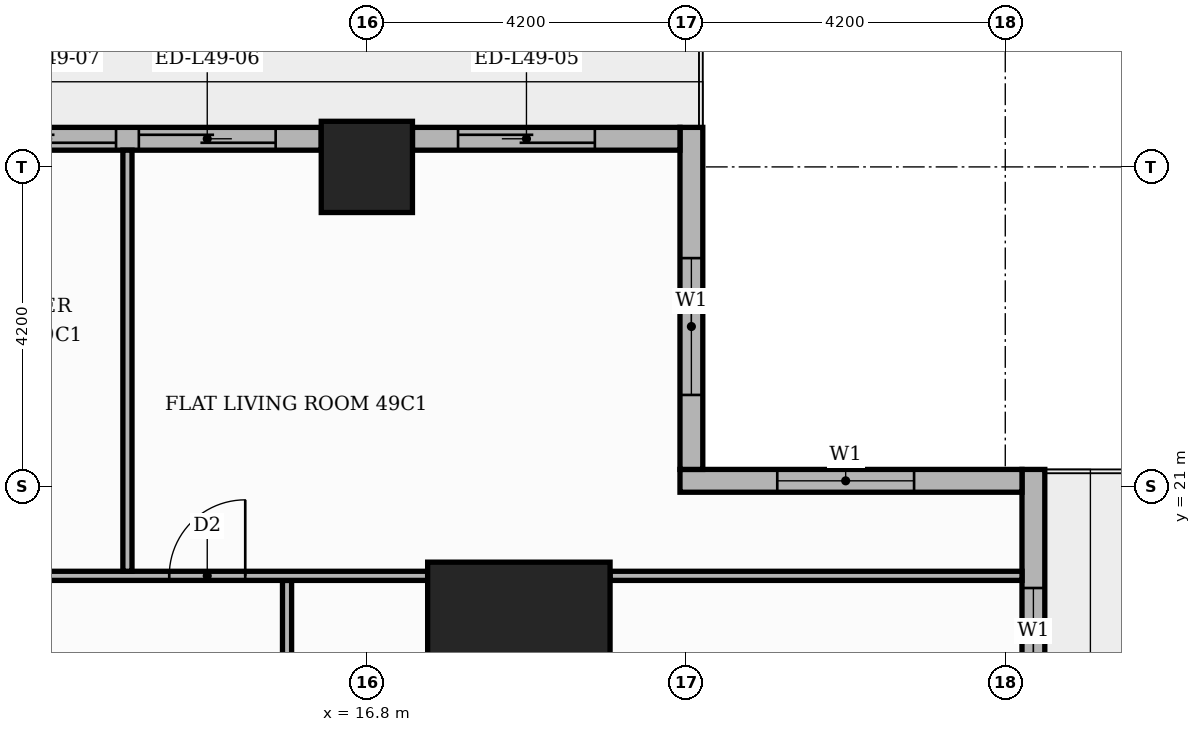
"""IFC4 building model, lengths in metres.
Left out: names, types, materials, properties, quantities, classifications, styles, units other than length and angle.
Written with IfcOpenShell. Run it as: python <this file> out.ifc"""

import sys

from ifc_helpers import new_model, si_unit, direction, frame, frame_2d, origin, origin_2d, place, context, subcontext, project, spatial, rectangle, extrude, element, fill, save


model = new_model("IFC4")
c1 = context("Model", 3, precision=1e-05, world=origin(), true_north=direction((0.0, 1.0)))
c2 = subcontext(c1, "Body", "Model", "MODEL_VIEW")
j1 = project(units=[si_unit("LENGTHUNIT", "METRE"), si_unit("PLANEANGLEUNIT", "RADIAN")], contexts=[c1])
p1 = place(None, origin())
s1 = spatial("IfcSite", under=j1, at=p1, CompositionType="ELEMENT")
p2 = place(p1, origin())
s2 = spatial("IfcBuilding", under=s1, at=p2, CompositionType="ELEMENT")
p3 = place(p2, frame((0.0, 0.0, 207.9)))
s3 = spatial("IfcBuildingStorey", under=s2, at=p3, CompositionType="ELEMENT", Elevation=207.9)
p4 = place(p3, frame((18.8, 18.8, 0.0), z_axis=(0.0, 0.0, 1.0), x_axis=(1.0, 0.0, 0.0)))
e1 = element("IfcColumn", 1, at=p4, inside=s3, PredefinedType="COLUMN", context=c2, shape_type="SweptSolid", body=[
    extrude(rectangle(XDim=2.4, YDim=2.4, at=origin_2d()), origin(), (0.0, 0.0, 1.0), 3.9),
])
p5 = place(p3, frame((16.8, 25.2, 0.0), z_axis=(0.0, 0.0, 1.0), x_axis=(1.0, 0.0, 0.0)))
e2 = element("IfcColumn", 2, at=p5, inside=s3, PredefinedType="COLUMN", context=c2, shape_type="SweptSolid", body=[
    extrude(rectangle(XDim=1.2, YDim=1.2, at=origin_2d()), origin(), (0.0, 0.0, 1.0), 3.9),
])
p6 = place(p3, frame((25.57, 17.4, 0.0), z_axis=(0.0, 0.0, 1.0), x_axis=(0.0, 1.0, 0.0)))
e3 = element("IfcWall", 3, at=p6, inside=s3, PredefinedType="STANDARD", context=c2, shape_type="SweptSolid", body=[
    extrude(rectangle(XDim=3.82, YDim=0.3, at=frame_2d((1.91, 0.0))), origin(), (0.0, 0.0, 1.0), 3.48),
])
p7 = place(p6, frame((0.46, 0.0, 0.9)))
e4 = element("IfcOpeningElement", 4, at=p7, cuts=e3, PredefinedType="OPENING", context=c2, shape_type="SweptSolid", body=[
    extrude(rectangle(XDim=1.8, YDim=2.1, at=frame_2d((0.9, 1.05))), frame((0.0, 0.16, 0.0), z_axis=(0.0, -1.0, 0.0), x_axis=(1.0, 0.0, 0.0)), (0.0, 0.0, 1.0), 0.32),
])
p8 = place(p3, frame((25.42, 21.07, 0.0), z_axis=(0.0, 0.0, 1.0), x_axis=(-1.0, 0.0, 0.0)))
e5 = element("IfcWall", 5, at=p8, inside=s3, PredefinedType="STANDARD", context=c2, shape_type="SweptSolid", body=[
    extrude(rectangle(XDim=4.5, YDim=0.3, at=frame_2d((2.25, 0.0))), origin(), (0.0, 0.0, 1.0), 3.48),
])
p9 = place(p8, frame((1.42, 0.0, 0.9)))
e6 = element("IfcOpeningElement", 6, at=p9, cuts=e5, PredefinedType="OPENING", context=c2, shape_type="SweptSolid", body=[
    extrude(rectangle(XDim=1.8, YDim=2.1, at=frame_2d((0.9, 1.05))), frame((0.0, 0.16, 0.0), z_axis=(0.0, -1.0, 0.0), x_axis=(1.0, 0.0, 0.0)), (0.0, 0.0, 1.0), 0.32),
])
p10 = place(p3, frame((21.07, 21.22, 0.0), z_axis=(0.0, 0.0, 1.0), x_axis=(0.0, 1.0, 0.0)))
e7 = element("IfcWall", 7, at=p10, inside=s3, PredefinedType="STANDARD", context=c2, shape_type="SweptSolid", body=[
    extrude(rectangle(XDim=4.5, YDim=0.3, at=frame_2d((2.25, 0.0))), origin(), (0.0, 0.0, 1.0), 3.48),
])
p11 = place(p10, frame((0.98, 0.0, 0.9)))
e8 = element("IfcOpeningElement", 8, at=p11, cuts=e7, PredefinedType="OPENING", context=c2, shape_type="SweptSolid", body=[
    extrude(rectangle(XDim=1.8, YDim=2.1, at=frame_2d((0.9, 1.05))), frame((0.0, 0.16, 0.0), z_axis=(0.0, -1.0, 0.0), x_axis=(1.0, 0.0, 0.0)), (0.0, 0.0, 1.0), 0.32),
])
p12 = place(p3, frame((20.92, 25.57, 0.0), z_axis=(0.0, 0.0, 1.0), x_axis=(-1.0, 0.0, 0.0)))
e9 = element("IfcWall", 9, at=p12, inside=s3, PredefinedType="STANDARD", context=c2, shape_type="SweptSolid", body=[
    extrude(rectangle(XDim=3.52, YDim=0.3, at=frame_2d((1.76, 0.0))), origin(), (0.0, 0.0, 1.0), 3.48),
])
p13 = place(p12, frame((1.12, 0.0, 0.0)))
e10 = element("IfcOpeningElement", 10, at=p13, cuts=e9, PredefinedType="OPENING", context=c2, shape_type="SweptSolid", body=[
    extrude(rectangle(XDim=1.8, YDim=2.4, at=frame_2d((0.9, 1.2))), frame((0.0, 0.16, 0.0), z_axis=(0.0, -1.0, 0.0), x_axis=(1.0, 0.0, 0.0)), (0.0, 0.0, 1.0), 0.32),
])
p14 = place(p3, frame((16.2, 25.57, 0.0), z_axis=(0.0, 0.0, 1.0), x_axis=(-1.0, 0.0, 0.0)))
e11 = element("IfcWall", 11, at=p14, inside=s3, PredefinedType="STANDARD", context=c2, shape_type="SweptSolid", body=[
    extrude(rectangle(XDim=7.2, YDim=0.3, at=frame_2d((3.6, 0.0))), origin(), (0.0, 0.0, 1.0), 3.48),
])
p15 = place(p14, frame((0.6, 0.0, 0.0)))
e12 = element("IfcOpeningElement", 12, at=p15, cuts=e11, PredefinedType="OPENING", context=c2, shape_type="SweptSolid", body=[
    extrude(rectangle(XDim=1.8, YDim=2.4, at=frame_2d((0.9, 1.2))), frame((0.0, 0.16, 0.0), z_axis=(0.0, -1.0, 0.0), x_axis=(1.0, 0.0, 0.0)), (0.0, 0.0, 1.0), 0.32),
])
p16 = place(p14, frame((2.7, 0.0, 0.0)))
e13 = element("IfcOpeningElement", 13, at=p16, cuts=e11, PredefinedType="OPENING", context=c2, shape_type="SweptSolid", body=[
    extrude(rectangle(XDim=1.8, YDim=2.4, at=frame_2d((0.9, 1.2))), frame((0.0, 0.16, 0.0), z_axis=(0.0, -1.0, 0.0), x_axis=(1.0, 0.0, 0.0)), (0.0, 0.0, 1.0), 0.32),
])
p17 = place(p14, frame((4.8, 0.0, 0.9)))
e14 = element("IfcOpeningElement", 14, at=p17, cuts=e11, PredefinedType="OPENING", context=c2, shape_type="SweptSolid", body=[
    extrude(rectangle(XDim=1.8, YDim=2.1, at=frame_2d((0.9, 1.05))), frame((0.0, 0.16, 0.0), z_axis=(0.0, -1.0, 0.0), x_axis=(1.0, 0.0, 0.0)), (0.0, 0.0, 1.0), 0.32),
])
p18 = place(p3, frame((15.75, 13.75, 0.0), z_axis=(0.0, 0.0, 1.0), x_axis=(0.0, 1.0, 0.0)))
e15 = element("IfcWall", 15, at=p18, inside=s3, PredefinedType="PARTITIONING", context=c2, shape_type="SweptSolid", body=[
    extrude(rectangle(XDim=6.01, YDim=0.12, at=frame_2d((3.005, 0.0))), origin(), (0.0, 0.0, 1.0), 3.48),
])
p19 = place(p18, frame((2.485, 0.0, 0.0)))
e16 = element("IfcOpeningElement", 16, at=p19, cuts=e15, PredefinedType="OPENING", context=c2, shape_type="SweptSolid", body=[
    extrude(rectangle(XDim=1.0, YDim=2.1, at=frame_2d((0.5, 1.05))), frame((0.0, 0.07, 0.0), z_axis=(0.0, -1.0, 0.0), x_axis=(1.0, 0.0, 0.0)), (0.0, 0.0, 1.0), 0.14),
])
p20 = place(p3, frame((5.35, 19.82, 0.0), z_axis=(0.0, 0.0, 1.0), x_axis=(1.0, 0.0, 0.0)))
e17 = element("IfcWall", 17, at=p20, inside=s3, PredefinedType="PARTITIONING", context=c2, shape_type="SweptSolid", body=[
    extrude(rectangle(XDim=12.25, YDim=0.12, at=frame_2d((6.125, 0.0))), origin(), (0.0, 0.0, 1.0), 3.48),
])
p21 = place(p20, frame((8.85, 0.0, 0.0)))
e18 = element("IfcOpeningElement", 18, at=p21, cuts=e17, PredefinedType="OPENING", context=c2, shape_type="SweptSolid", body=[
    extrude(rectangle(XDim=1.0, YDim=2.1, at=frame_2d((0.5, 1.05))), frame((0.0, 0.07, 0.0), z_axis=(0.0, -1.0, 0.0), x_axis=(1.0, 0.0, 0.0)), (0.0, 0.0, 1.0), 0.14),
])
p22 = place(p20, frame((5.75, 0.0, 0.0)))
e19 = element("IfcOpeningElement", 19, at=p22, cuts=e17, PredefinedType="OPENING", context=c2, shape_type="SweptSolid", body=[
    extrude(rectangle(XDim=0.9, YDim=2.1, at=frame_2d((0.45, 1.05))), frame((0.0, 0.07, 0.0), z_axis=(0.0, -1.0, 0.0), x_axis=(1.0, 0.0, 0.0)), (0.0, 0.0, 1.0), 0.14),
])
p23 = place(p3, frame((20.0, 19.82, 0.0), z_axis=(0.0, 0.0, 1.0), x_axis=(1.0, 0.0, 0.0)))
e20 = element("IfcWall", 20, at=p23, inside=s3, PredefinedType="PARTITIONING", context=c2, shape_type="SweptSolid", body=[
    extrude(rectangle(XDim=5.42, YDim=0.12, at=frame_2d((2.71, 0.0))), origin(), (0.0, 0.0, 1.0), 3.48),
])
p24 = place(p3, frame((13.65, 19.88, 0.0), z_axis=(0.0, 0.0, 1.0), x_axis=(0.0, 1.0, 0.0)))
e21 = element("IfcWall", 21, at=p24, inside=s3, PredefinedType="PARTITIONING", context=c2, shape_type="SweptSolid", body=[
    extrude(rectangle(XDim=5.54, YDim=0.12, at=frame_2d((2.77, 0.0))), origin(), (0.0, 0.0, 1.0), 3.48),
])
p25 = place(p7, origin())
e22 = element("IfcWindow", 22, at=p25, inside=s3, PartitioningType="SINGLE_PANEL", PredefinedType="WINDOW", context=c2, shape_type="SweptSolid", body=[
    extrude(rectangle(XDim=1.8, YDim=2.1, at=frame_2d((0.9, 1.05))), frame((0.0, 0.03, 0.0), z_axis=(0.0, -1.0, 0.0), x_axis=(1.0, 0.0, 0.0)), (0.0, 0.0, 1.0), 0.06),
])
fill(e4, e22)
p26 = place(p9, origin())
e23 = element("IfcWindow", 23, at=p26, inside=s3, PartitioningType="SINGLE_PANEL", PredefinedType="WINDOW", context=c2, shape_type="SweptSolid", body=[
    extrude(rectangle(XDim=1.8, YDim=2.1, at=frame_2d((0.9, 1.05))), frame((0.0, 0.03, 0.0), z_axis=(0.0, -1.0, 0.0), x_axis=(1.0, 0.0, 0.0)), (0.0, 0.0, 1.0), 0.06),
])
fill(e6, e23)
p27 = place(p11, origin())
e24 = element("IfcWindow", 24, at=p27, inside=s3, PartitioningType="SINGLE_PANEL", PredefinedType="WINDOW", context=c2, shape_type="SweptSolid", body=[
    extrude(rectangle(XDim=1.8, YDim=2.1, at=frame_2d((0.9, 1.05))), frame((0.0, 0.03, 0.0), z_axis=(0.0, -1.0, 0.0), x_axis=(1.0, 0.0, 0.0)), (0.0, 0.0, 1.0), 0.06),
])
fill(e8, e24)
p28 = place(p13, origin())
e25 = element("IfcDoor", 25, at=p28, inside=s3, OperationType="SLIDING_TO_RIGHT", PredefinedType="DOOR", context=c2, shape_type="SweptSolid", body=[
    extrude(rectangle(XDim=1.8, YDim=2.4, at=frame_2d((0.9, 1.2))), frame((0.0, 0.025, 0.0), z_axis=(0.0, -1.0, 0.0), x_axis=(1.0, 0.0, 0.0)), (0.0, 0.0, 1.0), 0.05),
])
fill(e10, e25)
p29 = place(p15, origin())
e26 = element("IfcDoor", 26, at=p29, inside=s3, OperationType="SLIDING_TO_LEFT", PredefinedType="DOOR", context=c2, shape_type="SweptSolid", body=[
    extrude(rectangle(XDim=1.8, YDim=2.4, at=frame_2d((0.9, 1.2))), frame((0.0, 0.025, 0.0), z_axis=(0.0, -1.0, 0.0), x_axis=(1.0, 0.0, 0.0)), (0.0, 0.0, 1.0), 0.05),
])
fill(e12, e26)
p30 = place(p16, origin())
e27 = element("IfcDoor", 27, at=p30, inside=s3, OperationType="SLIDING_TO_RIGHT", PredefinedType="DOOR", context=c2, shape_type="SweptSolid", body=[
    extrude(rectangle(XDim=1.8, YDim=2.4, at=frame_2d((0.9, 1.2))), frame((0.0, 0.025, 0.0), z_axis=(0.0, -1.0, 0.0), x_axis=(1.0, 0.0, 0.0)), (0.0, 0.0, 1.0), 0.05),
])
fill(e13, e27)
p31 = place(p21, origin())
e28 = element("IfcDoor", 28, at=p31, inside=s3, OperationType="SINGLE_SWING_RIGHT", PredefinedType="DOOR", context=c2, shape_type="SweptSolid", body=[
    extrude(rectangle(XDim=1.0, YDim=2.1, at=frame_2d((0.5, 1.05))), frame((0.0, 0.025, 0.0), z_axis=(0.0, -1.0, 0.0), x_axis=(1.0, 0.0, 0.0)), (0.0, 0.0, 1.0), 0.05),
])
fill(e18, e28)
save(model, sys.argv[1])
